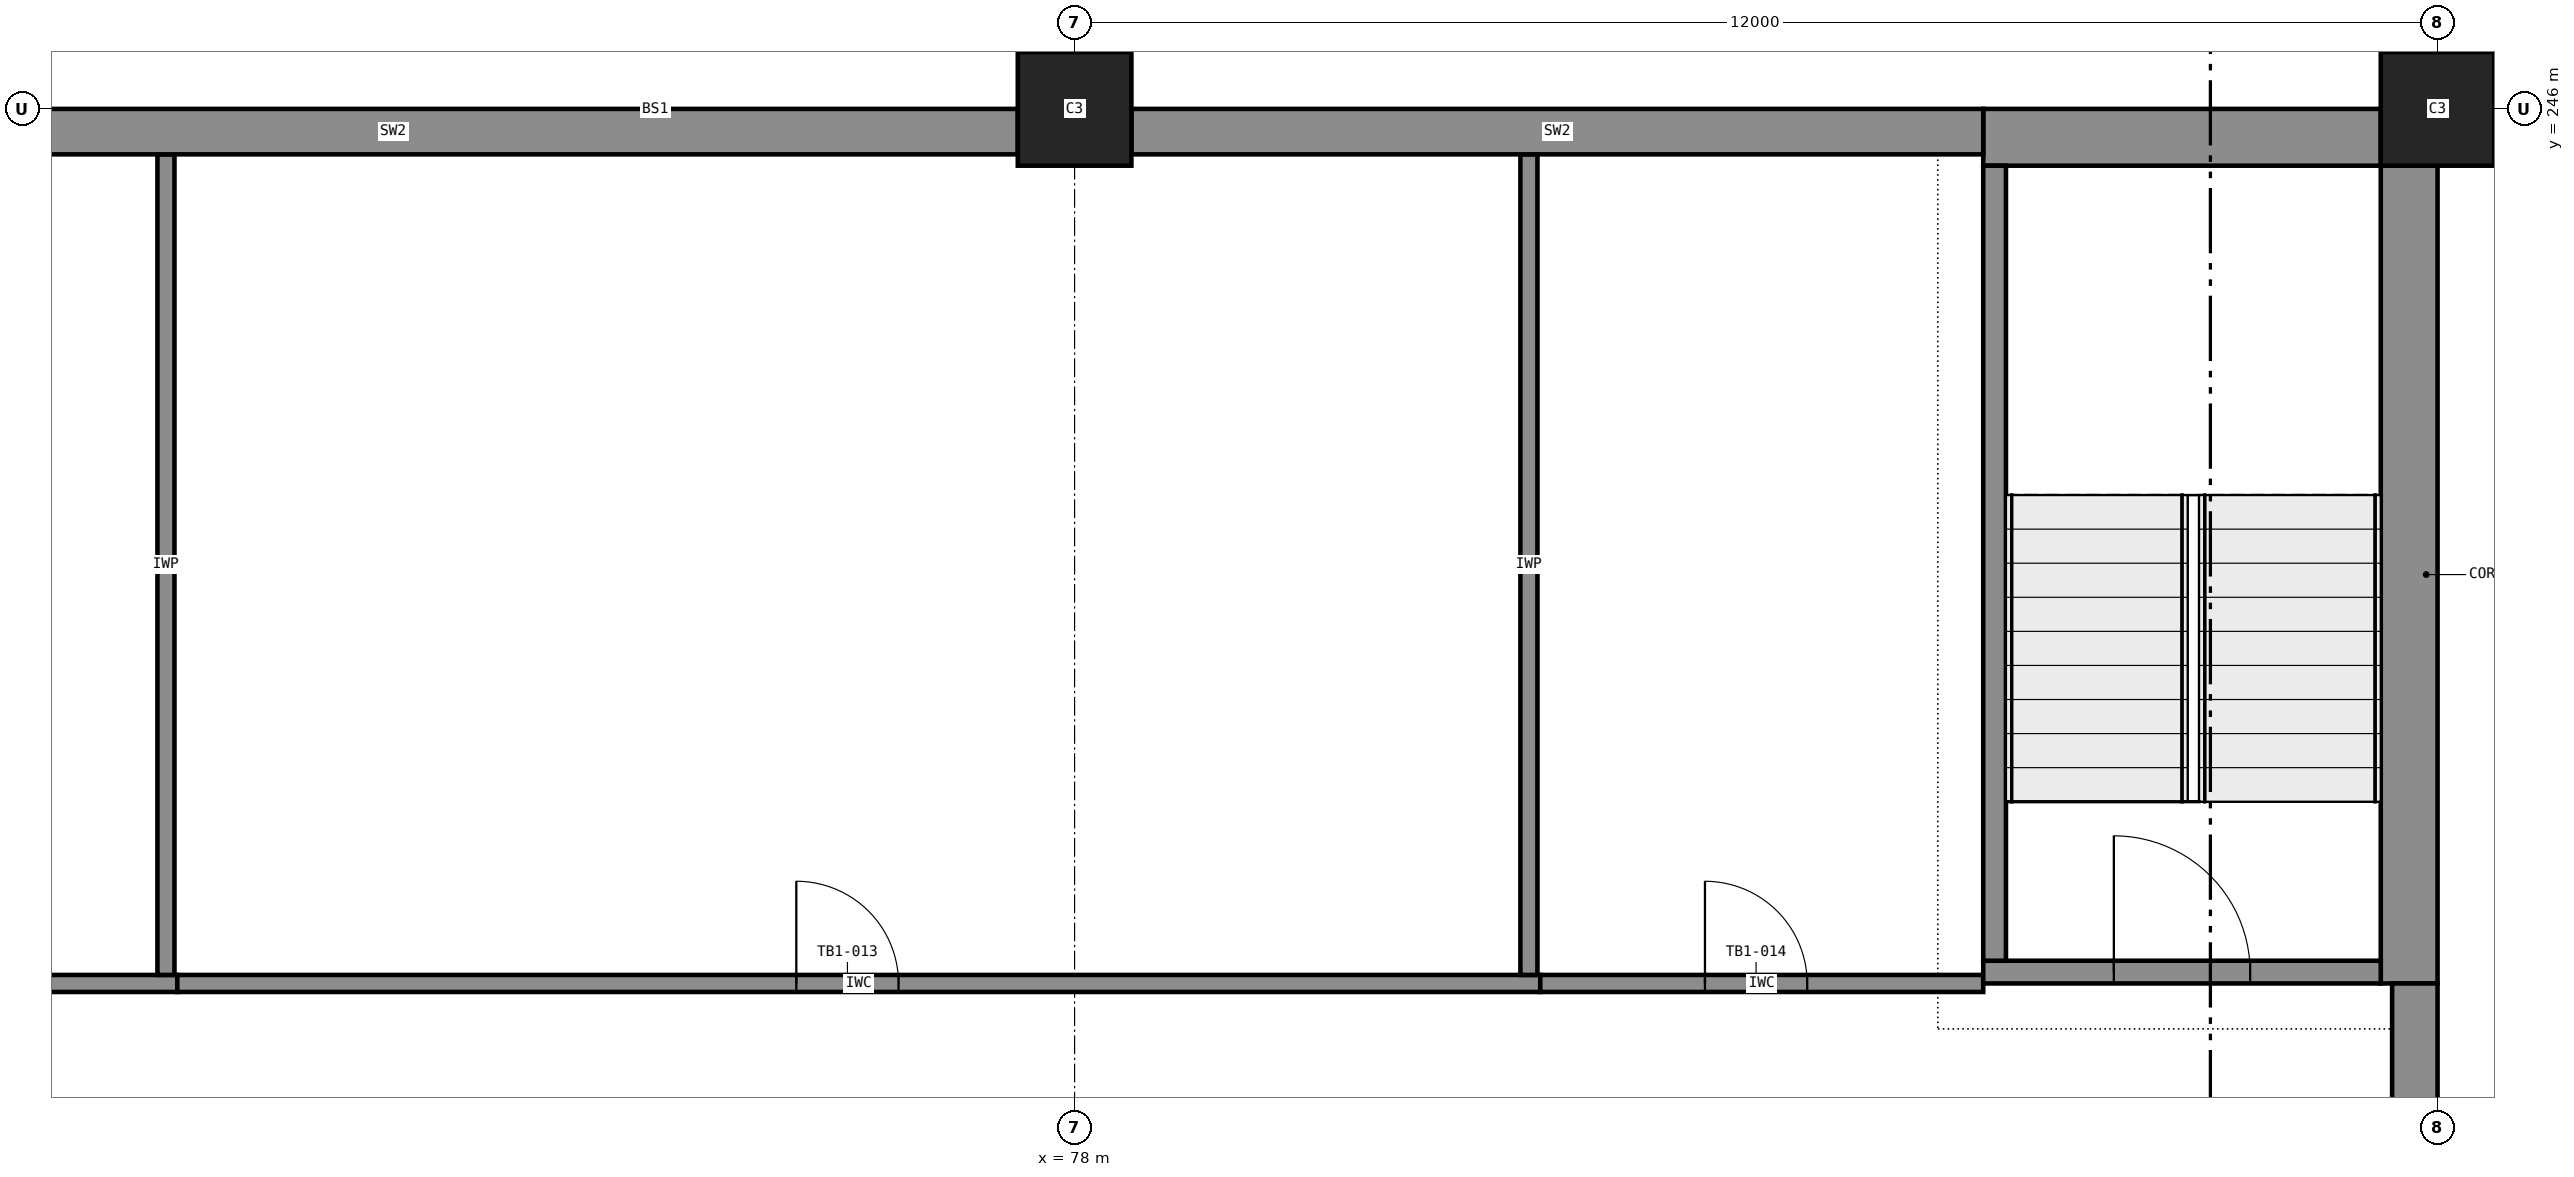
"""IFC4 building model, lengths in metres.
Left out: names, types, materials, properties, quantities, classifications, styles, units other than length and angle.
Written with IfcOpenShell. Run it as: python <this file> out.ifc"""

import sys

from ifc_helpers import new_model, si_unit, direction, frame, frame_2d, origin, origin_2d, place, context, subcontext, project, spatial, rectangle, extrude, element, fill, save


model = new_model("IFC4")
c1 = context("Model", 3, precision=1e-05, world=origin(), true_north=direction((0.0, 1.0)))
c2 = subcontext(c1, "Body", "Model", "MODEL_VIEW")
j1 = project(units=[si_unit("LENGTHUNIT", "METRE"), si_unit("PLANEANGLEUNIT", "RADIAN")], contexts=[c1])
p1 = place(None, origin())
s1 = spatial("IfcSite", under=j1, at=p1, CompositionType="ELEMENT")
p2 = place(p1, origin())
s2 = spatial("IfcBuilding", under=s1, at=p2, CompositionType="ELEMENT")
p3 = place(p2, frame((0.0, 0.0, -6.0)))
s3 = spatial("IfcBuildingStorey", under=s2, at=p3, CompositionType="ELEMENT", Elevation=-6.0)
for number, where, z_axis, x_axis in (
    (1, (78.0, 246.0, -0.4), (0.0, 0.0, 1.0), (1.0, 0.0, 0.0)),
    (2, (90.0, 246.0, -0.4), (0.0, 0.0, 1.0), (1.0, 0.0, 0.0)),
):
    element("IfcColumn", number, at=place(p3, frame(where, z_axis=z_axis, x_axis=x_axis)), inside=s3, PredefinedType="COLUMN", context=c2, shape_type="SweptSolid", body=[
        extrude(rectangle(XDim=1.0, YDim=1.0, at=origin_2d()), origin(), (0.0, 0.0, 1.0), 6.4),
    ])
p4 = place(p3, frame((89.75, 238.3, 0.0), z_axis=(0.0, 0.0, 1.0), x_axis=(0.0, 1.0, 0.0)))
e3 = element("IfcWall", 3, at=p4, inside=s3, PredefinedType="SHEAR", context=c2, shape_type="SweptSolid", body=[
    extrude(rectangle(XDim=7.2, YDim=0.5, at=frame_2d((3.6, 0.0))), origin(), (0.0, 0.0, 1.0), 5.7),
])
p5 = place(p3, frame((86.0, 245.75, 0.0), z_axis=(0.0, 0.0, 1.0), x_axis=(1.0, 0.0, 0.0)))
e4 = element("IfcWall", 4, at=p5, inside=s3, PredefinedType="SHEAR", context=c2, shape_type="SweptSolid", body=[
    extrude(rectangle(XDim=3.5, YDim=0.5, at=frame_2d((1.75, 0.0))), origin(), (0.0, 0.0, 1.0), 5.7),
])
p6 = place(p3, frame((86.0, 238.4, 0.0), z_axis=(0.0, 0.0, 1.0), x_axis=(1.0, 0.0, 0.0)))
e5 = element("IfcWall", 5, at=p6, inside=s3, PredefinedType="SHEAR", context=c2, shape_type="SweptSolid", body=[
    extrude(rectangle(XDim=3.5, YDim=0.2, at=frame_2d((1.75, 0.0))), origin(), (0.0, 0.0, 1.0), 6.0),
])
p7 = place(p6, frame((1.15, 0.0, 0.0)))
e6 = element("IfcOpeningElement", 6, at=p7, cuts=e5, PredefinedType="OPENING", context=c2, shape_type="SweptSolid", body=[
    extrude(rectangle(XDim=1.2, YDim=2.1, at=frame_2d((0.6, 1.05))), frame((0.0, 0.11, 0.0), z_axis=(0.0, -1.0, 0.0), x_axis=(1.0, 0.0, 0.0)), (0.0, 0.0, 1.0), 0.22),
])
p8 = place(p3, frame((86.1, 238.5, 0.0), z_axis=(0.0, 0.0, 1.0), x_axis=(0.0, 1.0, 0.0)))
e7 = element("IfcWall", 7, at=p8, inside=s3, PredefinedType="SHEAR", context=c2, shape_type="SweptSolid", body=[
    extrude(rectangle(XDim=7.0, YDim=0.2, at=frame_2d((3.5, 0.0))), origin(), (0.0, 0.0, 1.0), 6.0),
])
p9 = place(p3, frame((89.8, 234.5, 0.0), z_axis=(0.0, 0.0, 1.0), x_axis=(0.0, 1.0, 0.0)))
e8 = element("IfcWall", 8, at=p9, inside=s3, PredefinedType="SOLIDWALL", context=c2, shape_type="SweptSolid", body=[
    extrude(rectangle(XDim=3.8, YDim=0.4, at=frame_2d((1.9, 0.0))), origin(), (0.0, 0.0, 1.0), 5.7),
])
p10 = place(p3, frame((66.5, 245.8, 0.0), z_axis=(0.0, 0.0, 1.0), x_axis=(1.0, 0.0, 0.0)))
e9 = element("IfcWall", 9, at=p10, inside=s3, PredefinedType="SOLIDWALL", context=c2, shape_type="SweptSolid", body=[
    extrude(rectangle(XDim=11.0, YDim=0.4, at=frame_2d((5.5, 0.0))), origin(), (0.0, 0.0, 1.0), 5.7),
])
p11 = place(p3, frame((78.5, 245.8, 0.0), z_axis=(0.0, 0.0, 1.0), x_axis=(1.0, 0.0, 0.0)))
e10 = element("IfcWall", 10, at=p11, inside=s3, PredefinedType="SOLIDWALL", context=c2, shape_type="SweptSolid", body=[
    extrude(rectangle(XDim=7.5, YDim=0.4, at=frame_2d((3.75, 0.0))), origin(), (0.0, 0.0, 1.0), 5.7),
])
p12 = place(p3, frame((58.1, 238.3, 0.0), z_axis=(0.0, 0.0, 1.0), x_axis=(1.0, 0.0, 0.0)))
e11 = element("IfcWall", 11, at=p12, inside=s3, PredefinedType="PARTITIONING", context=c2, shape_type="SweptSolid", body=[
    extrude(rectangle(XDim=12.0, YDim=0.15, at=frame_2d((6.0, 0.0))), origin(), (0.0, 0.0, 1.0), 5.7),
])
p13 = place(p12, frame((5.45, 0.0, 0.0)))
e12 = element("IfcOpeningElement", 12, at=p13, cuts=e11, PredefinedType="OPENING", context=c2, shape_type="SweptSolid", body=[
    extrude(rectangle(XDim=0.9, YDim=2.1, at=frame_2d((0.45, 1.05))), frame((0.0, 0.085, 0.0), z_axis=(0.0, -1.0, 0.0), x_axis=(1.0, 0.0, 0.0)), (0.0, 0.0, 1.0), 0.17),
])
p14 = place(p3, frame((70.1, 238.3, 0.0), z_axis=(0.0, 0.0, 1.0), x_axis=(1.0, 0.0, 0.0)))
e13 = element("IfcWall", 13, at=p14, inside=s3, PredefinedType="PARTITIONING", context=c2, shape_type="SweptSolid", body=[
    extrude(rectangle(XDim=12.0, YDim=0.15, at=frame_2d((6.0, 0.0))), origin(), (0.0, 0.0, 1.0), 5.7),
])
p15 = place(p14, frame((5.45, 0.0, 0.0)))
e14 = element("IfcOpeningElement", 14, at=p15, cuts=e13, PredefinedType="OPENING", context=c2, shape_type="SweptSolid", body=[
    extrude(rectangle(XDim=0.9, YDim=2.1, at=frame_2d((0.45, 1.05))), frame((0.0, 0.085, 0.0), z_axis=(0.0, -1.0, 0.0), x_axis=(1.0, 0.0, 0.0)), (0.0, 0.0, 1.0), 0.17),
])
p16 = place(p3, frame((70.0, 245.6, 0.0), z_axis=(0.0, 0.0, 1.0), x_axis=(0.0, -1.0, 0.0)))
e15 = element("IfcWall", 15, at=p16, inside=s3, PredefinedType="PARTITIONING", context=c2, shape_type="SweptSolid", body=[
    extrude(rectangle(XDim=7.225, YDim=0.15, at=frame_2d((3.613, 0.0))), origin(), (0.0, 0.0, 1.0), 5.7),
])
p17 = place(p3, frame((82.1, 238.3, 0.0), z_axis=(0.0, 0.0, 1.0), x_axis=(1.0, 0.0, 0.0)))
e16 = element("IfcWall", 16, at=p17, inside=s3, PredefinedType="PARTITIONING", context=c2, shape_type="SweptSolid", body=[
    extrude(rectangle(XDim=3.9, YDim=0.15, at=frame_2d((1.95, 0.0))), origin(), (0.0, 0.0, 1.0), 5.7),
])
p18 = place(p17, frame((1.45, 0.0, 0.0)))
e17 = element("IfcOpeningElement", 17, at=p18, cuts=e16, PredefinedType="OPENING", context=c2, shape_type="SweptSolid", body=[
    extrude(rectangle(XDim=0.9, YDim=2.1, at=frame_2d((0.45, 1.05))), frame((0.0, 0.085, 0.0), z_axis=(0.0, -1.0, 0.0), x_axis=(1.0, 0.0, 0.0)), (0.0, 0.0, 1.0), 0.17),
])
p19 = place(p3, frame((82.0, 245.6, 0.0), z_axis=(0.0, 0.0, 1.0), x_axis=(0.0, -1.0, 0.0)))
e18 = element("IfcWall", 18, at=p19, inside=s3, PredefinedType="PARTITIONING", context=c2, shape_type="SweptSolid", body=[
    extrude(rectangle(XDim=7.225, YDim=0.15, at=frame_2d((3.613, 0.0))), origin(), (0.0, 0.0, 1.0), 5.7),
])
p20 = place(p15, origin())
e19 = element("IfcDoor", 19, at=p20, inside=s3, OperationType="SINGLE_SWING_LEFT", PredefinedType="DOOR", context=c2, shape_type="SweptSolid", body=[
    extrude(rectangle(XDim=0.9, YDim=2.1, at=frame_2d((0.45, 1.05))), frame((0.0, 0.025, 0.0), z_axis=(0.0, -1.0, 0.0), x_axis=(1.0, 0.0, 0.0)), (0.0, 0.0, 1.0), 0.05),
])
fill(e14, e19)
p21 = place(p18, origin())
e20 = element("IfcDoor", 20, at=p21, inside=s3, OperationType="SINGLE_SWING_LEFT", PredefinedType="DOOR", context=c2, shape_type="SweptSolid", body=[
    extrude(rectangle(XDim=0.9, YDim=2.1, at=frame_2d((0.45, 1.05))), frame((0.0, 0.025, 0.0), z_axis=(0.0, -1.0, 0.0), x_axis=(1.0, 0.0, 0.0)), (0.0, 0.0, 1.0), 0.05),
])
fill(e17, e20)
p22 = place(p7, origin())
e21 = element("IfcDoor", 21, at=p22, inside=s3, OperationType="SINGLE_SWING_LEFT", PredefinedType="DOOR", context=c2, shape_type="SweptSolid", body=[
    extrude(rectangle(XDim=1.2, YDim=2.1, at=frame_2d((0.6, 1.05))), frame((0.0, 0.025, 0.0), z_axis=(0.0, -1.0, 0.0), x_axis=(1.0, 0.0, 0.0)), (0.0, 0.0, 1.0), 0.05),
])
fill(e6, e21)
save(model, sys.argv[1])
